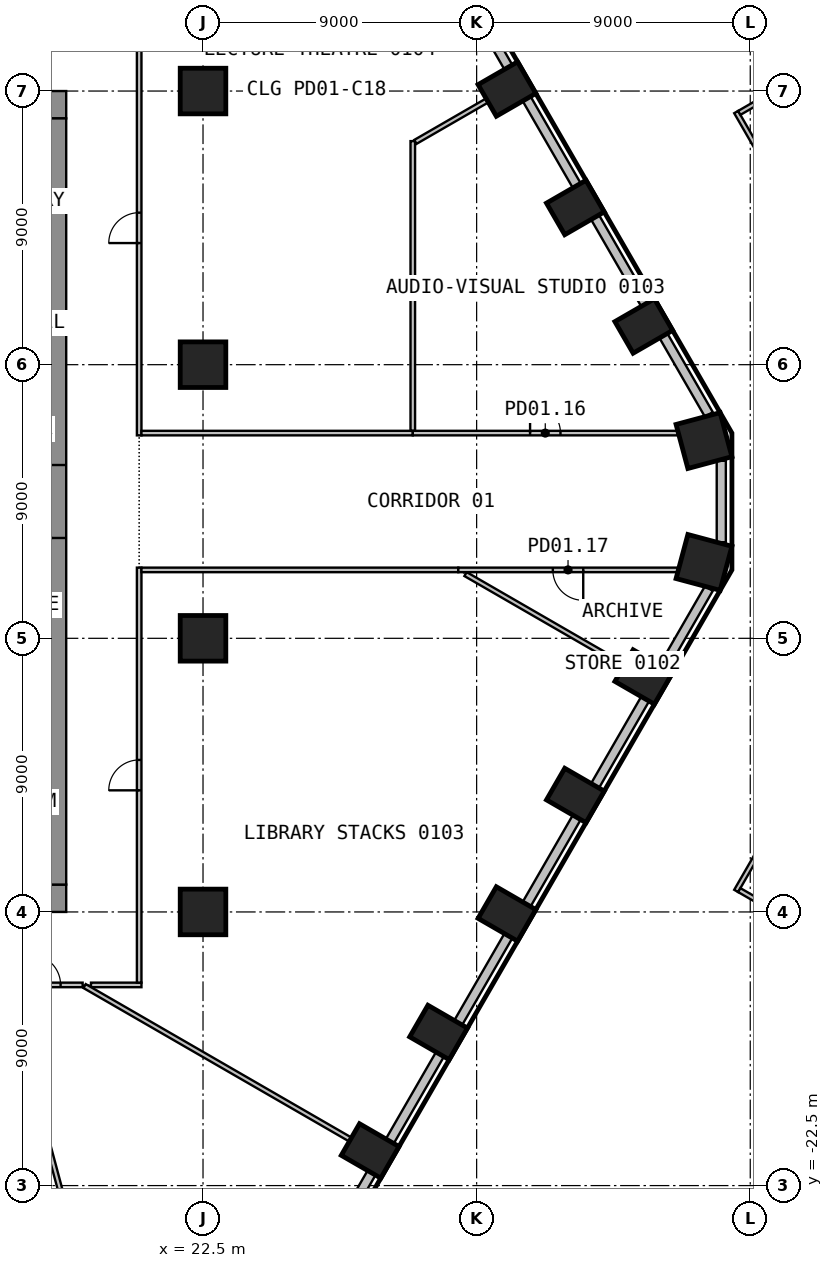
"""IFC4 building model, lengths in metres.
Left out: names, types, materials, properties, quantities, classifications, styles, units other than length and angle.
Written with IfcOpenShell. Run it as: python <this file> out.ifc"""

import sys

from ifc_helpers import new_model, si_unit, direction, frame, frame_2d, origin, origin_2d, place, context, subcontext, project, spatial, rectangle, circle, extrude, element, fill, save


model = new_model("IFC4")
c1 = context("Model", 3, precision=1e-05, world=origin(), true_north=direction((0.0, 1.0)))
c2 = subcontext(c1, "Body", "Model", "MODEL_VIEW")
j1 = project(units=[si_unit("LENGTHUNIT", "METRE"), si_unit("PLANEANGLEUNIT", "RADIAN")], contexts=[c1])
p1 = place(None, origin())
s1 = spatial("IfcSite", under=j1, at=p1, CompositionType="ELEMENT")
p2 = place(p1, origin())
s2 = spatial("IfcBuilding", under=s1, at=p2, CompositionType="ELEMENT")
p3 = place(p2, frame((0.0, 0.0, 6.0)))
s3 = spatial("IfcBuildingStorey", under=s2, at=p3, CompositionType="ELEMENT", Elevation=6.0)
for number, where, z_axis, x_axis in (
    (1, (27.998, -21.361, 0.0), (0.0, 0.0, 1.0), (0.5, 0.866, 0.0)),
    (2, (30.248, -17.463, 0.0), (0.0, 0.0, 1.0), (0.5, 0.866, 0.0)),
    (3, (32.498, -13.566, 0.0), (0.0, 0.0, 1.0), (0.5, 0.866, 0.0)),
    (4, (34.748, -9.669, 0.0), (0.0, 0.0, 1.0), (0.5, 0.866, 0.0)),
    (5, (36.998, -5.772, 0.0), (0.0, 0.0, 1.0), (0.5, 0.866, 0.0)),
):
    element("IfcColumn", number, at=place(p3, frame(where, z_axis=z_axis, x_axis=x_axis)), inside=s3, PredefinedType="COLUMN", context=c2, shape_type="SweptSolid", body=[
        extrude(rectangle(XDim=1.2, YDim=1.5, at=origin_2d()), origin(), (0.0, 0.0, 1.0), 4.4),
    ])
for number, where, z_axis, x_axis in (
    (6, (38.979, -2.004, 0.0), (0.0, 0.0, 1.0), (0.259, 0.966, 0.0)),
    (7, (38.979, 2.004, 0.0), (0.0, 0.0, 1.0), (-0.259, 0.966, 0.0)),
):
    element("IfcColumn", number, at=place(p3, frame(where, z_axis=z_axis, x_axis=x_axis)), inside=s3, PredefinedType="COLUMN", context=c2, shape_type="SweptSolid", body=[
        extrude(rectangle(XDim=1.5, YDim=1.5, at=origin_2d()), origin(), (0.0, 0.0, 1.0), 4.4),
    ])
for number, where, z_axis, x_axis in (
    (8, (36.998, 5.772, 0.0), (0.0, 0.0, 1.0), (-0.5, 0.866, 0.0)),
    (9, (34.748, 9.669, 0.0), (0.0, 0.0, 1.0), (-0.5, 0.866, 0.0)),
    (10, (32.498, 13.566, 0.0), (0.0, 0.0, 1.0), (-0.5, 0.866, 0.0)),
):
    element("IfcColumn", number, at=place(p3, frame(where, z_axis=z_axis, x_axis=x_axis)), inside=s3, PredefinedType="COLUMN", context=c2, shape_type="SweptSolid", body=[
        extrude(rectangle(XDim=1.2, YDim=1.5, at=origin_2d()), origin(), (0.0, 0.0, 1.0), 4.4),
    ])
for number, where, z_axis, x_axis in (
    (11, (22.5, -13.5, 0.0), (0.0, 0.0, 1.0), (1.0, 0.0, 0.0)),
    (12, (22.5, -4.5, 0.0), (0.0, 0.0, 1.0), (1.0, 0.0, 0.0)),
    (13, (22.5, 4.5, 0.0), (0.0, 0.0, 1.0), (1.0, 0.0, 0.0)),
    (14, (22.5, 13.5, 0.0), (0.0, 0.0, 1.0), (1.0, 0.0, 0.0)),
):
    element("IfcColumn", number, at=place(p3, frame(where, z_axis=z_axis, x_axis=x_axis)), inside=s3, PredefinedType="COLUMN", context=c2, shape_type="SweptSolid", body=[
        extrude(circle(Radius=0.75, at=origin_2d()), origin(), (0.0, 0.0, 1.0), 4.4),
    ])
for number, where, z_axis, x_axis in (
    (15, (26.394, -24.938, 0.0), (0.0, 0.0, 1.0), (0.5, 0.866, 0.0)),
    (16, (28.644, -21.041, 0.0), (0.0, 0.0, 1.0), (0.5, 0.866, 0.0)),
    (17, (30.894, -17.143, 0.0), (0.0, 0.0, 1.0), (0.5, 0.866, 0.0)),
    (18, (33.144, -13.246, 0.0), (0.0, 0.0, 1.0), (0.5, 0.866, 0.0)),
    (19, (35.394, -9.349, 0.0), (0.0, 0.0, 1.0), (0.5, 0.866, 0.0)),
):
    element("IfcWall", number, at=place(p3, frame(where, z_axis=z_axis, x_axis=x_axis)), inside=s3, PredefinedType="SOLIDWALL", context=c2, shape_type="SweptSolid", body=[
        extrude(rectangle(XDim=3.299, YDim=0.3, at=frame_2d((1.649, 0.0))), origin(), (0.0, 0.0, 1.0), 4.4),
    ])
p4 = place(p3, frame((37.644, -5.452, 0.0), z_axis=(0.0, 0.0, 1.0), x_axis=(0.49999586137, 0.866027793211, 0.0)))
e20 = element("IfcWall", 20, at=p4, inside=s3, PredefinedType="SOLIDWALL", context=c2, shape_type="SweptSolid", body=[
    extrude(rectangle(XDim=2.989, YDim=0.3, at=frame_2d((1.494, 0.0))), origin(), (0.0, 0.0, 1.0), 4.4),
])
p5 = place(p3, frame((39.547, -1.339, 0.0), z_axis=(0.0, 0.0, 1.0), x_axis=(0.0, 1.0, 0.0)))
e21 = element("IfcWall", 21, at=p5, inside=s3, PredefinedType="SOLIDWALL", context=c2, shape_type="SweptSolid", body=[
    extrude(rectangle(XDim=2.679, YDim=0.3, at=frame_2d((1.339, 0.0))), origin(), (0.0, 0.0, 1.0), 4.4),
])
p6 = place(p3, frame((39.139, 2.864, 0.0), z_axis=(0.0, 0.0, 1.0), x_axis=(-0.49999586137, 0.866027793211, 0.0)))
e22 = element("IfcWall", 22, at=p6, inside=s3, PredefinedType="SOLIDWALL", context=c2, shape_type="SweptSolid", body=[
    extrude(rectangle(XDim=2.989, YDim=0.3, at=frame_2d((1.494, 0.0))), origin(), (0.0, 0.0, 1.0), 4.4),
])
for number, where, z_axis, x_axis in (
    (23, (37.044, 6.492, 0.0), (0.0, 0.0, 1.0), (-0.5, 0.866, 0.0)),
    (24, (34.794, 10.389, 0.0), (0.0, 0.0, 1.0), (-0.5, 0.866, 0.0)),
    (25, (32.544, 14.286, 0.0), (0.0, 0.0, 1.0), (-0.5, 0.866, 0.0)),
):
    element("IfcWall", number, at=place(p3, frame(where, z_axis=z_axis, x_axis=x_axis)), inside=s3, PredefinedType="SOLIDWALL", context=c2, shape_type="SweptSolid", body=[
        extrude(rectangle(XDim=3.299, YDim=0.3, at=frame_2d((1.649, 0.0))), origin(), (0.0, 0.0, 1.0), 4.4),
    ])
p7 = place(p3, frame((-18.0, 13.05, 0.0), z_axis=(0.0, 0.0, 1.0), x_axis=(1.0, 0.0, 0.0)))
e26 = element("IfcWall", 26, at=p7, inside=s3, PredefinedType="SHEAR", context=c2, shape_type="SweptSolid", body=[
    extrude(rectangle(XDim=36.0, YDim=0.9, at=frame_2d((18.0, 0.0))), origin(), (0.0, 0.0, 1.0), 4.4),
])
p8 = place(p7, frame((16.8, 0.0, 0.0)))
e27 = element("IfcOpeningElement", 27, at=p8, cuts=e26, PredefinedType="OPENING", context=c2, shape_type="SweptSolid", body=[
    extrude(rectangle(XDim=2.4, YDim=2.1, at=frame_2d((1.2, 1.05))), frame((0.0, 0.46, 0.0), z_axis=(0.0, -1.0, 0.0), x_axis=(1.0, 0.0, 0.0)), (0.0, 0.0, 1.0), 0.92),
])
p9 = place(p7, frame((5.55, 0.0, 0.0)))
e28 = element("IfcOpeningElement", 28, at=p9, cuts=e26, PredefinedType="OPENING", context=c2, shape_type="SweptSolid", body=[
    extrude(rectangle(XDim=1.2, YDim=2.1, at=frame_2d((0.6, 1.05))), frame((0.0, 0.46, 0.0), z_axis=(0.0, -1.0, 0.0), x_axis=(1.0, 0.0, 0.0)), (0.0, 0.0, 1.0), 0.92),
])
p10 = place(p7, frame((29.25, 0.0, 0.0)))
e29 = element("IfcOpeningElement", 29, at=p10, cuts=e26, PredefinedType="OPENING", context=c2, shape_type="SweptSolid", body=[
    extrude(rectangle(XDim=1.2, YDim=2.1, at=frame_2d((0.6, 1.05))), frame((0.0, 0.46, 0.0), z_axis=(0.0, -1.0, 0.0), x_axis=(1.0, 0.0, 0.0)), (0.0, 0.0, 1.0), 0.92),
])
p11 = place(p3, frame((-18.0, -13.05, 0.0), z_axis=(0.0, 0.0, 1.0), x_axis=(1.0, 0.0, 0.0)))
e30 = element("IfcWall", 30, at=p11, inside=s3, PredefinedType="SHEAR", context=c2, shape_type="SweptSolid", body=[
    extrude(rectangle(XDim=36.0, YDim=0.9, at=frame_2d((18.0, 0.0))), origin(), (0.0, 0.0, 1.0), 4.4),
])
p12 = place(p11, frame((16.8, 0.0, 0.0)))
e31 = element("IfcOpeningElement", 31, at=p12, cuts=e30, PredefinedType="OPENING", context=c2, shape_type="SweptSolid", body=[
    extrude(rectangle(XDim=2.4, YDim=2.1, at=frame_2d((1.2, 1.05))), frame((0.0, 0.46, 0.0), z_axis=(0.0, -1.0, 0.0), x_axis=(1.0, 0.0, 0.0)), (0.0, 0.0, 1.0), 0.92),
])
p13 = place(p11, frame((5.55, 0.0, 0.0)))
e32 = element("IfcOpeningElement", 32, at=p13, cuts=e30, PredefinedType="OPENING", context=c2, shape_type="SweptSolid", body=[
    extrude(rectangle(XDim=1.2, YDim=2.1, at=frame_2d((0.6, 1.05))), frame((0.0, 0.46, 0.0), z_axis=(0.0, -1.0, 0.0), x_axis=(1.0, 0.0, 0.0)), (0.0, 0.0, 1.0), 0.92),
])
p14 = place(p11, frame((29.25, 0.0, 0.0)))
e33 = element("IfcOpeningElement", 33, at=p14, cuts=e30, PredefinedType="OPENING", context=c2, shape_type="SweptSolid", body=[
    extrude(rectangle(XDim=1.2, YDim=2.1, at=frame_2d((0.6, 1.05))), frame((0.0, 0.46, 0.0), z_axis=(0.0, -1.0, 0.0), x_axis=(1.0, 0.0, 0.0)), (0.0, 0.0, 1.0), 0.92),
])
p15 = place(p3, frame((17.55, -12.6, 0.0), z_axis=(0.0, 0.0, 1.0), x_axis=(0.0, 1.0, 0.0)))
e34 = element("IfcWall", 34, at=p15, inside=s3, PredefinedType="SHEAR", context=c2, shape_type="SweptSolid", body=[
    extrude(rectangle(XDim=25.2, YDim=0.9, at=frame_2d((12.6, 0.0))), origin(), (0.0, 0.0, 1.0), 4.4),
])
p16 = place(p15, frame((11.4, 0.0, 0.0)))
e35 = element("IfcOpeningElement", 35, at=p16, cuts=e34, PredefinedType="OPENING", context=c2, shape_type="SweptSolid", body=[
    extrude(rectangle(XDim=2.4, YDim=2.1, at=frame_2d((1.2, 1.05))), frame((0.0, 0.46, 0.0), z_axis=(0.0, -1.0, 0.0), x_axis=(1.0, 0.0, 0.0)), (0.0, 0.0, 1.0), 0.92),
])
p17 = place(p3, frame((45.334, -3.632, 0.0), z_axis=(0.0, 0.0, 1.0), x_axis=(-0.499965106835, -0.866045548425, 0.0)))
e36 = element("IfcWall", 36, at=p17, inside=s3, PredefinedType="PARTITIONING", context=c2, shape_type="SweptSolid", body=[
    extrude(rectangle(XDim=10.596, YDim=0.15, at=frame_2d((5.298, 0.0))), origin(), (0.0, 0.0, 1.0), 4.05),
])
p18 = place(p3, frame((40.139, -12.781, 0.0), z_axis=(0.0, 0.0, 1.0), x_axis=(0.866022831428, -0.500004455426, 0.0)))
e37 = element("IfcWall", 37, at=p18, inside=s3, PredefinedType="PARTITIONING", context=c2, shape_type="SweptSolid", body=[
    extrude(rectangle(XDim=8.593, YDim=0.15, at=frame_2d((4.297, 0.0))), origin(), (0.0, 0.0, 1.0), 4.05),
])
p19 = place(p3, frame((40.037, 12.809, 0.0), z_axis=(0.0, 0.0, 1.0), x_axis=(0.499965106835, -0.866045548425, 0.0)))
e38 = element("IfcWall", 38, at=p19, inside=s3, PredefinedType="PARTITIONING", context=c2, shape_type="SweptSolid", body=[
    extrude(rectangle(XDim=10.596, YDim=0.15, at=frame_2d((5.298, 0.0))), origin(), (0.0, 0.0, 1.0), 4.05),
])
p20 = place(p3, frame((47.581, 17.078, 0.0), z_axis=(0.0, 0.0, 1.0), x_axis=(-0.866022831428, -0.500004455426, 0.0)))
e39 = element("IfcWall", 39, at=p20, inside=s3, PredefinedType="PARTITIONING", context=c2, shape_type="SweptSolid", body=[
    extrude(rectangle(XDim=8.593, YDim=0.15, at=frame_2d((4.297, 0.0))), origin(), (0.0, 0.0, 1.0), 4.05),
])
p21 = place(p3, frame((16.09, -15.9, 0.0), z_axis=(0.0, 0.0, 1.0), x_axis=(1.0, 0.0, 0.0)))
e40 = element("IfcWall", 40, at=p21, inside=s3, PredefinedType="PARTITIONING", context=c2, shape_type="SweptSolid", body=[
    extrude(rectangle(XDim=2.45, YDim=0.15, at=frame_2d((1.225, 0.0))), origin(), (0.0, 0.0, 1.0), 4.4),
])
p22 = place(p21, frame((0.725, 0.0, 0.0)))
e41 = element("IfcOpeningElement", 41, at=p22, cuts=e40, PredefinedType="OPENING", context=c2, shape_type="SweptSolid", body=[
    extrude(rectangle(XDim=1.0, YDim=2.1, at=frame_2d((0.5, 1.05))), frame((0.0, 0.085, 0.0), z_axis=(0.0, -1.0, 0.0), x_axis=(1.0, 0.0, 0.0)), (0.0, 0.0, 1.0), 0.17),
])
p23 = place(p3, frame((16.014, -15.972, 0.0), z_axis=(0.0, 0.0, 1.0), x_axis=(0.258843305697, -0.965919325356, 0.0)))
e42 = element("IfcWall", 42, at=p23, inside=s3, PredefinedType="PARTITIONING", context=c2, shape_type="SweptSolid", body=[
    extrude(rectangle(XDim=14.644, YDim=0.15, at=frame_2d((7.322, 0.0))), origin(), (0.0, 0.0, 1.0), 4.4),
])
p24 = place(p3, frame((18.815, -15.9, 0.0), z_axis=(0.0, 0.0, 1.0), x_axis=(1.0, 0.0, 0.0)))
e43 = element("IfcWall", 43, at=p24, inside=s3, PredefinedType="PARTITIONING", context=c2, shape_type="SweptSolid", body=[
    extrude(rectangle(XDim=1.66, YDim=0.15, at=frame_2d((0.83, 0.0))), origin(), (0.0, 0.0, 1.0), 4.4),
])
p25 = place(p3, frame((18.605, -15.938, 0.0), z_axis=(0.0, 0.0, 1.0), x_axis=(0.865988664976, -0.500063628085, 0.0)))
e44 = element("IfcWall", 44, at=p25, inside=s3, PredefinedType="PARTITIONING", context=c2, shape_type="SweptSolid", body=[
    extrude(rectangle(XDim=10.076, YDim=0.15, at=frame_2d((5.038, 0.0))), origin(), (0.0, 0.0, 1.0), 4.4),
])
p26 = place(p3, frame((20.4, -15.825, 0.0), z_axis=(0.0, 0.0, 1.0), x_axis=(0.0, 1.0, 0.0)))
e45 = element("IfcWall", 45, at=p26, inside=s3, PredefinedType="PARTITIONING", context=c2, shape_type="SweptSolid", body=[
    extrude(rectangle(XDim=13.65, YDim=0.15, at=frame_2d((6.825, 0.0))), origin(), (0.0, 0.0, 1.0), 4.4),
])
p27 = place(p26, frame((6.325, 0.0, 0.0)))
e46 = element("IfcOpeningElement", 46, at=p27, cuts=e45, PredefinedType="OPENING", context=c2, shape_type="SweptSolid", body=[
    extrude(rectangle(XDim=1.0, YDim=2.1, at=frame_2d((0.5, 1.05))), frame((0.0, 0.085, 0.0), z_axis=(0.0, -1.0, 0.0), x_axis=(1.0, 0.0, 0.0)), (0.0, 0.0, 1.0), 0.17),
])
p28 = place(p3, frame((30.897, -2.25, 0.0), z_axis=(0.0, 0.0, 1.0), x_axis=(-1.0, 0.0, 0.0)))
e47 = element("IfcWall", 47, at=p28, inside=s3, PredefinedType="PARTITIONING", context=c2, shape_type="SweptSolid", body=[
    extrude(rectangle(XDim=10.422, YDim=0.15, at=frame_2d((5.211, 0.0))), origin(), (0.0, 0.0, 1.0), 4.4),
])
p29 = place(p3, frame((20.4, 2.175, 0.0), z_axis=(0.0, 0.0, 1.0), x_axis=(0.0, 1.0, 0.0)))
e48 = element("IfcWall", 48, at=p29, inside=s3, PredefinedType="PARTITIONING", context=c2, shape_type="SweptSolid", body=[
    extrude(rectangle(XDim=13.65, YDim=0.15, at=frame_2d((6.825, 0.0))), origin(), (0.0, 0.0, 1.0), 4.4),
])
p30 = place(p29, frame((6.325, 0.0, 0.0)))
e49 = element("IfcOpeningElement", 49, at=p30, cuts=e48, PredefinedType="OPENING", context=c2, shape_type="SweptSolid", body=[
    extrude(rectangle(XDim=1.0, YDim=2.1, at=frame_2d((0.5, 1.05))), frame((0.0, 0.085, 0.0), z_axis=(0.0, -1.0, 0.0), x_axis=(1.0, 0.0, 0.0)), (0.0, 0.0, 1.0), 0.17),
])
p31 = place(p3, frame((20.475, 2.25, 0.0), z_axis=(0.0, 0.0, 1.0), x_axis=(1.0, 0.0, 0.0)))
e50 = element("IfcWall", 50, at=p31, inside=s3, PredefinedType="PARTITIONING", context=c2, shape_type="SweptSolid", body=[
    extrude(rectangle(XDim=8.925, YDim=0.15, at=frame_2d((4.462, 0.0))), origin(), (0.0, 0.0, 1.0), 4.4),
])
p32 = place(p3, frame((29.4, 11.853, 0.0), z_axis=(0.0, 0.0, 1.0), x_axis=(0.0, -1.0, 0.0)))
e51 = element("IfcWall", 51, at=p32, inside=s3, PredefinedType="PARTITIONING", context=c2, shape_type="SweptSolid", body=[
    extrude(rectangle(XDim=9.528, YDim=0.15, at=frame_2d((4.764, 0.0))), origin(), (0.0, 0.0, 1.0), 4.4),
])
p33 = place(p3, frame((29.4, 2.25, 0.0), z_axis=(0.0, 0.0, 1.0), x_axis=(1.0, 0.0, 0.0)))
e52 = element("IfcWall", 52, at=p33, inside=s3, PredefinedType="PARTITIONING", context=c2, shape_type="SweptSolid", body=[
    extrude(rectangle(XDim=8.716, YDim=0.15, at=frame_2d((4.358, 0.0))), origin(), (0.0, 0.0, 1.0), 4.4),
])
p34 = place(p33, frame((3.858, 0.0, 0.0)))
e53 = element("IfcOpeningElement", 53, at=p34, cuts=e52, PredefinedType="OPENING", context=c2, shape_type="SweptSolid", body=[
    extrude(rectangle(XDim=1.0, YDim=2.1, at=frame_2d((0.5, 1.05))), frame((0.0, 0.085, 0.0), z_axis=(0.0, -1.0, 0.0), x_axis=(1.0, 0.0, 0.0)), (0.0, 0.0, 1.0), 0.17),
])
p35 = place(p3, frame((31.831, 13.181, 0.0), z_axis=(0.0, 0.0, 1.0), x_axis=(-0.865991810323, -0.500058181068, 0.0)))
e54 = element("IfcWall", 54, at=p35, inside=s3, PredefinedType="PARTITIONING", context=c2, shape_type="SweptSolid", body=[
    extrude(rectangle(XDim=2.707, YDim=0.15, at=frame_2d((1.354, 0.0))), origin(), (0.0, 0.0, 1.0), 4.4),
])
p36 = place(p3, frame((31.135, -2.387, 0.0), z_axis=(0.0, 0.0, 1.0), x_axis=(0.866018198007, -0.500012480565, 0.0)))
e55 = element("IfcWall", 55, at=p36, inside=s3, PredefinedType="PARTITIONING", context=c2, shape_type="SweptSolid", body=[
    extrude(rectangle(XDim=5.999, YDim=0.15, at=frame_2d((3.0, 0.0))), origin(), (0.0, 0.0, 1.0), 4.4),
])
p37 = place(p3, frame((38.115, -2.25, 0.0), z_axis=(0.0, 0.0, 1.0), x_axis=(-1.0, 0.0, 0.0)))
e56 = element("IfcWall", 56, at=p37, inside=s3, PredefinedType="PARTITIONING", context=c2, shape_type="SweptSolid", body=[
    extrude(rectangle(XDim=7.219, YDim=0.15, at=frame_2d((3.609, 0.0))), origin(), (0.0, 0.0, 1.0), 4.4),
])
p38 = place(p37, frame((3.109, 0.0, 0.0)))
e57 = element("IfcOpeningElement", 57, at=p38, cuts=e56, PredefinedType="OPENING", context=c2, shape_type="SweptSolid", body=[
    extrude(rectangle(XDim=1.0, YDim=2.1, at=frame_2d((0.5, 1.05))), frame((0.0, 0.085, 0.0), z_axis=(0.0, -1.0, 0.0), x_axis=(1.0, 0.0, 0.0)), (0.0, 0.0, 1.0), 0.17),
])
p39 = place(p16, origin())
e58 = element("IfcDoor", 58, at=p39, inside=s3, OperationType="DOUBLE_DOOR_DOUBLE_SWING", PredefinedType="DOOR", context=c2, shape_type="SweptSolid", body=[
    extrude(rectangle(XDim=2.4, YDim=2.1, at=frame_2d((1.2, 1.05))), frame((0.0, 0.025, 0.0), z_axis=(0.0, -1.0, 0.0), x_axis=(1.0, 0.0, 0.0)), (0.0, 0.0, 1.0), 0.05),
])
fill(e35, e58)
p40 = place(p22, origin())
e59 = element("IfcDoor", 59, at=p40, inside=s3, OperationType="SINGLE_SWING_LEFT", PredefinedType="DOOR", context=c2, shape_type="SweptSolid", body=[
    extrude(rectangle(XDim=1.0, YDim=2.1, at=frame_2d((0.5, 1.05))), frame((0.0, 0.025, 0.0), z_axis=(0.0, -1.0, 0.0), x_axis=(1.0, 0.0, 0.0)), (0.0, 0.0, 1.0), 0.05),
])
fill(e41, e59)
p41 = place(p30, origin())
e60 = element("IfcDoor", 60, at=p41, inside=s3, OperationType="SINGLE_SWING_RIGHT", PredefinedType="DOOR", context=c2, shape_type="SweptSolid", body=[
    extrude(rectangle(XDim=1.0, YDim=2.1, at=frame_2d((0.5, 1.05))), frame((0.0, 0.025, 0.0), z_axis=(0.0, -1.0, 0.0), x_axis=(1.0, 0.0, 0.0)), (0.0, 0.0, 1.0), 0.05),
])
fill(e49, e60)
p42 = place(p27, origin())
e61 = element("IfcDoor", 61, at=p42, inside=s3, OperationType="SINGLE_SWING_LEFT", PredefinedType="DOOR", context=c2, shape_type="SweptSolid", body=[
    extrude(rectangle(XDim=1.0, YDim=2.1, at=frame_2d((0.5, 1.05))), frame((0.0, 0.025, 0.0), z_axis=(0.0, -1.0, 0.0), x_axis=(1.0, 0.0, 0.0)), (0.0, 0.0, 1.0), 0.05),
])
fill(e46, e61)
p43 = place(p34, origin())
e62 = element("IfcDoor", 62, at=p43, inside=s3, OperationType="SINGLE_SWING_RIGHT", PredefinedType="DOOR", context=c2, shape_type="SweptSolid", body=[
    extrude(rectangle(XDim=1.0, YDim=2.1, at=frame_2d((0.5, 1.05))), frame((0.0, 0.025, 0.0), z_axis=(0.0, -1.0, 0.0), x_axis=(1.0, 0.0, 0.0)), (0.0, 0.0, 1.0), 0.05),
])
fill(e53, e62)
p44 = place(p38, origin())
e63 = element("IfcDoor", 63, at=p44, inside=s3, OperationType="SINGLE_SWING_RIGHT", PredefinedType="DOOR", context=c2, shape_type="SweptSolid", body=[
    extrude(rectangle(XDim=1.0, YDim=2.1, at=frame_2d((0.5, 1.05))), frame((0.0, 0.025, 0.0), z_axis=(0.0, -1.0, 0.0), x_axis=(1.0, 0.0, 0.0)), (0.0, 0.0, 1.0), 0.05),
])
fill(e57, e63)
save(model, sys.argv[1])
